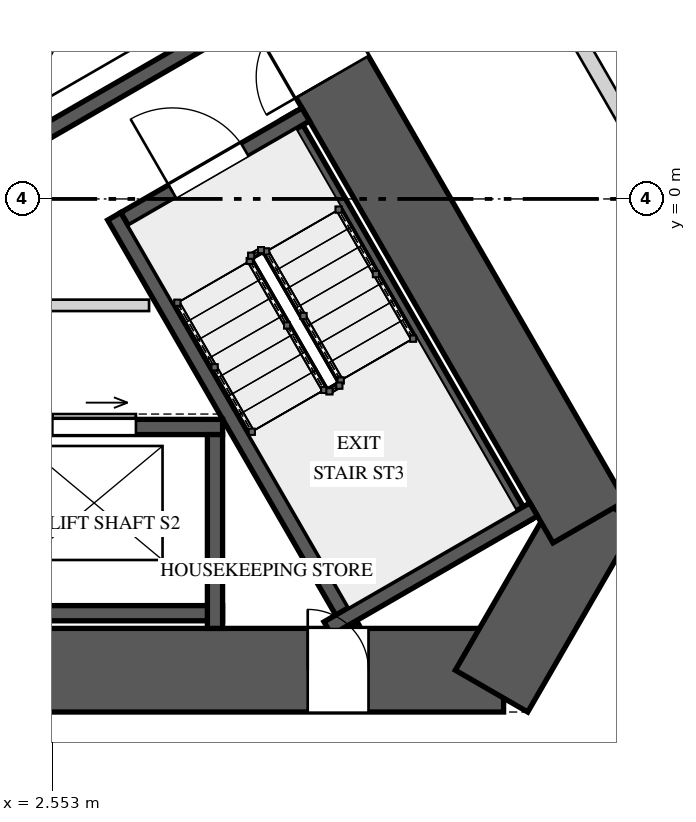
"""IFC4 building model, lengths in metres.
Left out: names, types, materials, properties, quantities, classifications, styles, units other than length and angle.
Written with IfcOpenShell. Run it as: python <this file> out.ifc"""

import sys

from ifc_helpers import new_model, si_unit, direction, frame, frame_2d, origin, place, context, subcontext, project, spatial, rectangle, extrude, element, fill, save


model = new_model("IFC4")
c1 = context("Model", 3, precision=1e-05, world=origin(), true_north=direction((0.0, 1.0)))
c2 = subcontext(c1, "Body", "Model", "MODEL_VIEW")
j1 = project(units=[si_unit("LENGTHUNIT", "METRE"), si_unit("PLANEANGLEUNIT", "RADIAN")], contexts=[c1])
p1 = place(None, origin())
s1 = spatial("IfcSite", under=j1, at=p1, CompositionType="ELEMENT")
p2 = place(p1, origin())
s2 = spatial("IfcBuilding", under=s1, at=p2, CompositionType="ELEMENT")
p3 = place(p2, frame((0.0, 0.0, 25.0)))
s3 = spatial("IfcBuildingStorey", under=s2, at=p3, CompositionType="ELEMENT", Elevation=25.0)
p4 = place(p3, frame((-8.487, -6.2, 0.0), z_axis=(0.0, 0.0, 1.0), x_axis=(1.0, 0.0, 0.0)))
e1 = element("IfcWall", 1, at=p4, inside=s3, PredefinedType="SHEAR", context=c2, shape_type="SweptSolid", body=[
    extrude(rectangle(XDim=16.974, YDim=1.1, at=frame_2d((8.487, 0.0))), origin(), (0.0, 0.0, 1.0), 5.0),
])
p5 = place(p4, frame((6.692, 0.0, 0.0)))
e2 = element("IfcOpeningElement", 2, at=p5, cuts=e1, PredefinedType="OPENING", context=c2, shape_type="SweptSolid", body=[
    extrude(rectangle(XDim=1.0, YDim=2.4, at=frame_2d((0.5, 1.2))), frame((0.0, 0.56, 0.0), z_axis=(0.0, -1.0, 0.0), x_axis=(1.0, 0.0, 0.0)), (0.0, 0.0, 1.0), 1.12),
])
p6 = place(p4, frame((14.397, 0.0, 0.0)))
e3 = element("IfcOpeningElement", 3, at=p6, cuts=e1, PredefinedType="OPENING", context=c2, shape_type="SweptSolid", body=[
    extrude(rectangle(XDim=0.8, YDim=2.1, at=frame_2d((0.4, 1.05))), frame((0.0, 0.56, 0.0), z_axis=(0.0, -1.0, 0.0), x_axis=(1.0, 0.0, 0.0)), (0.0, 0.0, 1.0), 1.12),
])
p7 = place(p3, frame((8.328, -6.475, 0.0), z_axis=(0.0, 0.0, 1.0), x_axis=(0.499995765644, 0.866027848477, 0.0)))
e4 = element("IfcWall", 4, at=p7, inside=s3, PredefinedType="SHEAR", context=c2, shape_type="SweptSolid", body=[
    extrude(rectangle(XDim=2.887, YDim=1.1, at=frame_2d((1.443, 0.0))), origin(), (0.0, 0.0, 1.0), 5.0),
])
p8 = place(p3, frame((9.613, -4.25, 0.0), z_axis=(0.0, 0.0, 1.0), x_axis=(-0.500001757713, 0.866024388966, 0.0)))
e5 = element("IfcWall", 5, at=p8, inside=s3, PredefinedType="SHEAR", context=c2, shape_type="SweptSolid", body=[
    extrude(rectangle(XDim=16.974, YDim=1.1, at=frame_2d((8.487, 0.0))), origin(), (0.0, 0.0, 1.0), 5.0),
])
p9 = place(p8, frame((6.762, 0.0, 0.0)))
e6 = element("IfcOpeningElement", 6, at=p9, cuts=e5, PredefinedType="OPENING", context=c2, shape_type="SweptSolid", body=[
    extrude(rectangle(XDim=1.0, YDim=2.4, at=frame_2d((0.5, 1.2))), frame((0.0, 0.56, 0.0), z_axis=(0.0, -1.0, 0.0), x_axis=(1.0, 0.0, 0.0)), (0.0, 0.0, 1.0), 1.12),
])
p10 = place(p8, frame((13.889, 0.0, 0.0)))
e7 = element("IfcOpeningElement", 7, at=p10, cuts=e5, PredefinedType="OPENING", context=c2, shape_type="SweptSolid", body=[
    extrude(rectangle(XDim=0.8, YDim=2.1, at=frame_2d((0.4, 1.05))), frame((0.0, 0.56, 0.0), z_axis=(0.0, -1.0, 0.0), x_axis=(1.0, 0.0, 0.0)), (0.0, 0.0, 1.0), 1.12),
])
p11 = place(p3, frame((8.76, -4.272, 0.0), z_axis=(0.0, 0.0, 1.0), x_axis=(-0.49998037582, 0.866036733513, 0.0)))
e8 = element("IfcWall", 8, at=p11, inside=s3, PredefinedType="SOLIDWALL", context=c2, shape_type="SweptSolid", body=[
    extrude(rectangle(XDim=6.2, YDim=0.2, at=frame_2d((3.1, 0.0))), origin(), (0.0, 0.0, 1.0), 4.65),
])
p12 = place(p3, frame((6.495, -5.65, 0.0), z_axis=(0.0, 0.0, 1.0), x_axis=(-0.499976754523, 0.866038824151, 0.0)))
e9 = element("IfcWall", 9, at=p12, inside=s3, PredefinedType="SOLIDWALL", context=c2, shape_type="SweptSolid", body=[
    extrude(rectangle(XDim=6.26, YDim=0.2, at=frame_2d((3.13, 0.0))), origin(), (0.0, 0.0, 1.0), 4.65),
])
p13 = place(p3, frame((6.174, -5.65, 0.0), z_axis=(0.0, 0.0, 1.0), x_axis=(0.866054327916, 0.499949898588, 0.0)))
e10 = element("IfcWall", 10, at=p13, inside=s3, PredefinedType="SOLIDWALL", context=c2, shape_type="SweptSolid", body=[
    extrude(rectangle(XDim=3.128, YDim=0.2, at=frame_2d((1.564, 0.0))), origin(), (0.0, 0.0, 1.0), 4.65),
])
p14 = place(p3, frame((3.501, -0.265, 0.0), z_axis=(0.0, 0.0, 1.0), x_axis=(0.866027397988, 0.499996545922, 0.0)))
e11 = element("IfcWall", 11, at=p14, inside=s3, PredefinedType="SOLIDWALL", context=c2, shape_type="SweptSolid", body=[
    extrude(rectangle(XDim=2.75, YDim=0.2, at=frame_2d((1.375, 0.0))), origin(), (0.0, 0.0, 1.0), 4.65),
])
p15 = place(p14, frame((0.725, 0.0, 0.0)))
e12 = element("IfcOpeningElement", 12, at=p15, cuts=e11, PredefinedType="OPENING", context=c2, shape_type="SweptSolid", body=[
    extrude(rectangle(XDim=1.1, YDim=2.4, at=frame_2d((0.55, 1.2))), frame((0.0, 0.11, 0.0), z_axis=(0.0, -1.0, 0.0), x_axis=(1.0, 0.0, 0.0)), (0.0, 0.0, 1.0), 0.22),
])
p16 = place(p3, frame((-0.71, -3.0, 0.0), z_axis=(0.0, 0.0, 1.0), x_axis=(1.0, 0.0, 0.0)))
e13 = element("IfcWall", 13, at=p16, inside=s3, PredefinedType="SOLIDWALL", context=c2, shape_type="SweptSolid", body=[
    extrude(rectangle(XDim=5.5, YDim=0.2, at=frame_2d((2.75, 0.0))), origin(), (0.0, 0.0, 1.0), 4.65),
])
p17 = place(p16, frame((0.61, 0.0, 0.0)))
e14 = element("IfcOpeningElement", 14, at=p17, cuts=e13, PredefinedType="OPENING", context=c2, shape_type="SweptSolid", body=[
    extrude(rectangle(XDim=1.1, YDim=2.1, at=frame_2d((0.55, 1.05))), frame((0.0, 0.11, 0.0), z_axis=(0.0, -1.0, 0.0), x_axis=(1.0, 0.0, 0.0)), (0.0, 0.0, 1.0), 0.22),
])
p18 = place(p16, frame((3.26, 0.0, 0.0)))
e15 = element("IfcOpeningElement", 15, at=p18, cuts=e13, PredefinedType="OPENING", context=c2, shape_type="SweptSolid", body=[
    extrude(rectangle(XDim=1.1, YDim=2.1, at=frame_2d((0.55, 1.05))), frame((0.0, 0.11, 0.0), z_axis=(0.0, -1.0, 0.0), x_axis=(1.0, 0.0, 0.0)), (0.0, 0.0, 1.0), 0.22),
])
p19 = place(p3, frame((-0.71, -5.45, 0.0), z_axis=(0.0, 0.0, 1.0), x_axis=(1.0, 0.0, 0.0)))
e16 = element("IfcWall", 16, at=p19, inside=s3, PredefinedType="SOLIDWALL", context=c2, shape_type="SweptSolid", body=[
    extrude(rectangle(XDim=5.5, YDim=0.2, at=frame_2d((2.75, 0.0))), origin(), (0.0, 0.0, 1.0), 4.65),
])
p20 = place(p3, frame((4.69, -3.1, 0.0), z_axis=(0.0, 0.0, 1.0), x_axis=(0.0, -1.0, 0.0)))
e17 = element("IfcWall", 17, at=p20, inside=s3, PredefinedType="SOLIDWALL", context=c2, shape_type="SweptSolid", body=[
    extrude(rectangle(XDim=2.55, YDim=0.2, at=frame_2d((1.275, 0.0))), origin(), (0.0, 0.0, 1.0), 4.65),
])
p21 = place(p3, frame((2.227, 0.743, 0.0), z_axis=(0.0, 0.0, 1.0), x_axis=(0.866014461049, 0.500018952895, 0.0)))
e18 = element("IfcWall", 18, at=p21, inside=s3, PredefinedType="SOLIDWALL", context=c2, shape_type="SweptSolid", body=[
    extrude(rectangle(XDim=3.35, YDim=0.2, at=frame_2d((1.675, 0.0))), origin(), (0.0, 0.0, 1.0), 4.65),
])
p22 = place(p3, frame((-4.053, -1.4, 0.0), z_axis=(0.0, 0.0, 1.0), x_axis=(1.0, 0.0, 0.0)))
e19 = element("IfcWall", 19, at=p22, inside=s3, PredefinedType="PARTITIONING", context=c2, shape_type="SweptSolid", body=[
    extrude(rectangle(XDim=7.876, YDim=0.15, at=frame_2d((3.938, 0.0))), origin(), (0.0, 0.0, 1.0), 4.65),
])
p23 = place(p3, frame((9.219, 2.533, 0.0), z_axis=(0.0, 0.0, 1.0), x_axis=(0.499940848033, -0.866059552495, 0.0)))
e20 = element("IfcWall", 20, at=p23, inside=s3, PredefinedType="SOLIDWALL", context=c2, shape_type="SweptSolid", body=[
    extrude(rectangle(XDim=3.032, YDim=0.2, at=frame_2d((1.516, 0.0))), origin(), (0.0, 0.0, 1.0), 4.65),
])
p24 = place(p15, origin())
e21 = element("IfcDoor", 21, at=p24, inside=s3, OperationType="SINGLE_SWING_RIGHT", PredefinedType="DOOR", context=c2, shape_type="SweptSolid", body=[
    extrude(rectangle(XDim=1.1, YDim=2.4, at=frame_2d((0.55, 1.2))), frame((0.0, 0.025, 0.0), z_axis=(0.0, -1.0, 0.0), x_axis=(1.0, 0.0, 0.0)), (0.0, 0.0, 1.0), 0.05),
])
fill(e12, e21)
p25 = place(p18, origin())
e22 = element("IfcDoor", 22, at=p25, inside=s3, OperationType="SLIDING_TO_RIGHT", PredefinedType="DOOR", context=c2, shape_type="SweptSolid", body=[
    extrude(rectangle(XDim=1.1, YDim=2.1, at=frame_2d((0.55, 1.05))), frame((0.0, 0.025, 0.0), z_axis=(0.0, -1.0, 0.0), x_axis=(1.0, 0.0, 0.0)), (0.0, 0.0, 1.0), 0.05),
])
fill(e15, e22)
p26 = place(p9, origin())
e23 = element("IfcDoor", 23, at=p26, inside=s3, OperationType="SINGLE_SWING_RIGHT", PredefinedType="DOOR", context=c2, shape_type="SweptSolid", body=[
    extrude(rectangle(XDim=1.0, YDim=2.4, at=frame_2d((0.5, 1.2))), frame((0.0, 0.025, 0.0), z_axis=(0.0, -1.0, 0.0), x_axis=(1.0, 0.0, 0.0)), (0.0, 0.0, 1.0), 0.05),
])
fill(e6, e23)
p27 = place(p6, origin())
e24 = element("IfcDoor", 24, at=p27, inside=s3, OperationType="SINGLE_SWING_LEFT", PredefinedType="DOOR", context=c2, shape_type="SweptSolid", body=[
    extrude(rectangle(XDim=0.8, YDim=2.1, at=frame_2d((0.4, 1.05))), frame((0.0, 0.025, 0.0), z_axis=(0.0, -1.0, 0.0), x_axis=(1.0, 0.0, 0.0)), (0.0, 0.0, 1.0), 0.05),
])
fill(e3, e24)
save(model, sys.argv[1])
